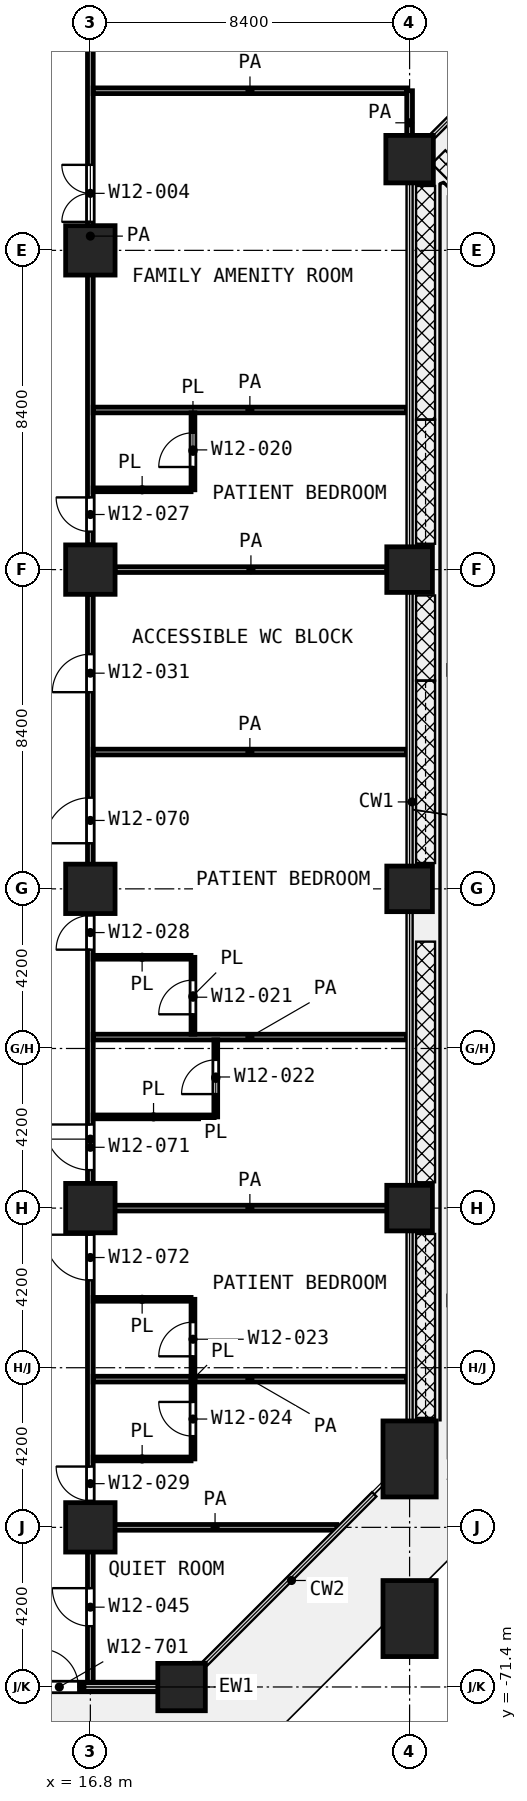
"""IFC4 building model, lengths in metres.
Left out: names, types, materials, properties, quantities, classifications, styles, units other than length and angle.
Written with IfcOpenShell. Run it as: python <this file> out.ifc"""

import sys

from ifc_helpers import new_model, si_unit, direction, frame, frame_2d, origin, origin_2d, place, context, subcontext, project, spatial, rectangle, extrude, element, fill, save


model = new_model("IFC4")
c1 = context("Model", 3, precision=1e-05, world=origin(), true_north=direction((0.0, 1.0)))
c2 = subcontext(c1, "Body", "Model", "MODEL_VIEW")
j1 = project(units=[si_unit("LENGTHUNIT", "METRE"), si_unit("PLANEANGLEUNIT", "RADIAN")], contexts=[c1])
p1 = place(None, origin())
s1 = spatial("IfcSite", under=j1, at=p1, CompositionType="ELEMENT")
p2 = place(p1, origin())
s2 = spatial("IfcBuilding", under=s1, at=p2, CompositionType="ELEMENT")
p3 = place(p2, frame((0.0, 0.0, 56.0)))
s3 = spatial("IfcBuildingStorey", under=s2, at=p3, CompositionType="ELEMENT", Elevation=56.0)
p4 = place(p3, frame((25.2, -31.2, 0.0), z_axis=(0.0, 0.0, 1.0), x_axis=(1.0, 0.0, 0.0)))
e1 = element("IfcColumn", 1, at=p4, inside=s3, PredefinedType="COLUMN", context=c2, shape_type="SweptSolid", body=[
    extrude(rectangle(XDim=1.25, YDim=1.25, at=origin_2d()), origin(), (0.0, 0.0, 1.0), 4.2),
])
for number, where, z_axis, x_axis in (
    (2, (16.8, -33.6, 0.0), (0.0, 0.0, 1.0), (1.0, 0.0, 0.0)),
    (3, (16.8, -42.0, 0.0), (0.0, 0.0, 1.0), (1.0, 0.0, 0.0)),
):
    element("IfcColumn", number, at=place(p3, frame(where, z_axis=z_axis, x_axis=x_axis)), inside=s3, PredefinedType="COLUMN", context=c2, shape_type="SweptSolid", body=[
        extrude(rectangle(XDim=1.3, YDim=1.3, at=origin_2d()), origin(), (0.0, 0.0, 1.0), 4.2),
    ])
p5 = place(p3, frame((25.2, -42.0, 0.0), z_axis=(0.0, 0.0, 1.0), x_axis=(1.0, 0.0, 0.0)))
e4 = element("IfcColumn", 4, at=p5, inside=s3, PredefinedType="COLUMN", context=c2, shape_type="SweptSolid", body=[
    extrude(rectangle(XDim=1.2, YDim=1.2, at=origin_2d()), origin(), (0.0, 0.0, 1.0), 4.2),
])
p6 = place(p3, frame((16.8, -50.4, 0.0), z_axis=(0.0, 0.0, 1.0), x_axis=(1.0, 0.0, 0.0)))
e5 = element("IfcColumn", 5, at=p6, inside=s3, PredefinedType="COLUMN", context=c2, shape_type="SweptSolid", body=[
    extrude(rectangle(XDim=1.3, YDim=1.3, at=origin_2d()), origin(), (0.0, 0.0, 1.0), 4.2),
])
p7 = place(p3, frame((25.2, -50.4, 0.0), z_axis=(0.0, 0.0, 1.0), x_axis=(1.0, 0.0, 0.0)))
e6 = element("IfcColumn", 6, at=p7, inside=s3, PredefinedType="COLUMN", context=c2, shape_type="SweptSolid", body=[
    extrude(rectangle(XDim=1.2, YDim=1.2, at=origin_2d()), origin(), (0.0, 0.0, 1.0), 4.2),
])
p8 = place(p3, frame((16.8, -58.8, 0.0), z_axis=(0.0, 0.0, 1.0), x_axis=(1.0, 0.0, 0.0)))
e7 = element("IfcColumn", 7, at=p8, inside=s3, PredefinedType="COLUMN", context=c2, shape_type="SweptSolid", body=[
    extrude(rectangle(XDim=1.3, YDim=1.3, at=origin_2d()), origin(), (0.0, 0.0, 1.0), 4.2),
])
p9 = place(p3, frame((25.2, -58.8, 0.0), z_axis=(0.0, 0.0, 1.0), x_axis=(1.0, 0.0, 0.0)))
e8 = element("IfcColumn", 8, at=p9, inside=s3, PredefinedType="COLUMN", context=c2, shape_type="SweptSolid", body=[
    extrude(rectangle(XDim=1.2, YDim=1.2, at=origin_2d()), origin(), (0.0, 0.0, 1.0), 4.2),
])
p10 = place(p3, frame((25.2, -65.4, 0.0), z_axis=(0.0, 0.0, 1.0), x_axis=(0.0, -1.0, 0.0)))
e9 = element("IfcColumn", 9, at=p10, inside=s3, PredefinedType="COLUMN", context=c2, shape_type="SweptSolid", body=[
    extrude(rectangle(XDim=2.0, YDim=1.4, at=origin_2d()), origin(), (0.0, 0.0, 1.0), 4.2),
])
p11 = place(p3, frame((16.8, -67.2, 0.0), z_axis=(0.0, 0.0, 1.0), x_axis=(1.0, 0.0, 0.0)))
e10 = element("IfcColumn", 10, at=p11, inside=s3, PredefinedType="COLUMN", context=c2, shape_type="SweptSolid", body=[
    extrude(rectangle(XDim=1.3, YDim=1.3, at=origin_2d()), origin(), (0.0, 0.0, 1.0), 4.2),
])
p12 = place(p3, frame((19.2, -71.4, 0.0), z_axis=(0.0, 0.0, 1.0), x_axis=(1.0, 0.0, 0.0)))
e11 = element("IfcColumn", 11, at=p12, inside=s3, PredefinedType="COLUMN", context=c2, shape_type="SweptSolid", body=[
    extrude(rectangle(XDim=1.25, YDim=1.25, at=origin_2d()), origin(), (0.0, 0.0, 1.0), 4.2),
])
p13 = place(p3, frame((25.2, -69.6, 0.0), z_axis=(0.0, 0.0, 1.0), x_axis=(0.0, -1.0, 0.0)))
e12 = element("IfcColumn", 12, at=p13, inside=s3, PredefinedType="COLUMN", context=c2, shape_type="SweptSolid", body=[
    extrude(rectangle(XDim=2.0, YDim=1.4, at=origin_2d()), origin(), (0.0, 0.0, 1.0), 4.2),
])
p14 = place(p3, frame((14.592, -71.4, 0.0), z_axis=(0.0, 0.0, 1.0), x_axis=(1.0, 0.0, 0.0)))
e13 = element("IfcWall", 13, at=p14, inside=s3, PredefinedType="SOLIDWALL", context=c2, shape_type="SweptSolid", body=[
    extrude(rectangle(XDim=3.983, YDim=0.25, at=frame_2d((1.992, 0.0))), origin(), (0.0, 0.0, 1.0), 3.78),
])
p15 = place(p14, frame((0.892, 0.0, 0.0)))
e14 = element("IfcOpeningElement", 14, at=p15, cuts=e13, PredefinedType="OPENING", context=c2, shape_type="SweptSolid", body=[
    extrude(rectangle(XDim=1.0, YDim=2.1, at=frame_2d((0.5, 1.05))), frame((0.0, 0.135, 0.0), z_axis=(0.0, -1.0, 0.0), x_axis=(1.0, 0.0, 0.0)), (0.0, 0.0, 1.0), 0.27),
])
for number, where, z_axis, x_axis in (
    (15, (16.875, -65.4, 0.0), (0.0, 0.0, 1.0), (1.0, 0.0, 0.0)),
    (16, (16.875, -61.2, 0.0), (0.0, 0.0, 1.0), (1.0, 0.0, 0.0)),
):
    element("IfcWall", number, at=place(p3, frame(where, z_axis=z_axis, x_axis=x_axis)), inside=s3, PredefinedType="PARTITIONING", context=c2, shape_type="SweptSolid", body=[
        extrude(rectangle(XDim=2.575, YDim=0.1, at=frame_2d((1.288, 0.0))), origin(), (0.0, 0.0, 1.0), 3.9),
    ])
p16 = place(p3, frame((16.875, -56.4, 0.0), z_axis=(0.0, 0.0, 1.0), x_axis=(1.0, 0.0, 0.0)))
e17 = element("IfcWall", 17, at=p16, inside=s3, PredefinedType="PARTITIONING", context=c2, shape_type="SweptSolid", body=[
    extrude(rectangle(XDim=3.175, YDim=0.1, at=frame_2d((1.587, 0.0))), origin(), (0.0, 0.0, 1.0), 3.9),
])
p17 = place(p3, frame((16.875, -52.2, 0.0), z_axis=(0.0, 0.0, 1.0), x_axis=(1.0, 0.0, 0.0)))
e18 = element("IfcWall", 18, at=p17, inside=s3, PredefinedType="PARTITIONING", context=c2, shape_type="SweptSolid", body=[
    extrude(rectangle(XDim=2.574, YDim=0.1, at=frame_2d((1.287, 0.0))), origin(), (0.0, 0.0, 1.0), 3.9),
])
p18 = place(p3, frame((16.875, -39.9, 0.0), z_axis=(0.0, 0.0, 1.0), x_axis=(1.0, 0.0, 0.0)))
e19 = element("IfcWall", 19, at=p18, inside=s3, PredefinedType="PARTITIONING", context=c2, shape_type="SweptSolid", body=[
    extrude(rectangle(XDim=2.575, YDim=0.1, at=frame_2d((1.288, 0.0))), origin(), (0.0, 0.0, 1.0), 3.9),
])
p19 = place(p3, frame((19.5, -65.4, 0.0), z_axis=(0.0, 0.0, 1.0), x_axis=(0.0, 1.0, 0.0)))
e20 = element("IfcWall", 20, at=p19, inside=s3, PredefinedType="PARTITIONING", context=c2, shape_type="SweptSolid", body=[
    extrude(rectangle(XDim=4.2, YDim=0.1, at=frame_2d((2.1, 0.0))), origin(), (0.0, 0.0, 1.0), 3.9),
])
p20 = place(p19, frame((2.7, 0.0, 0.0)))
e21 = element("IfcOpeningElement", 21, at=p20, cuts=e20, PredefinedType="OPENING", context=c2, shape_type="SweptSolid", body=[
    extrude(rectangle(XDim=0.9, YDim=2.1, at=frame_2d((0.45, 1.05))), frame((0.0, 0.06, 0.0), z_axis=(0.0, -1.0, 0.0), x_axis=(1.0, 0.0, 0.0)), (0.0, 0.0, 1.0), 0.12),
])
p21 = place(p19, frame((0.6, 0.0, 0.0)))
e22 = element("IfcOpeningElement", 22, at=p21, cuts=e20, PredefinedType="OPENING", context=c2, shape_type="SweptSolid", body=[
    extrude(rectangle(XDim=0.9, YDim=2.1, at=frame_2d((0.45, 1.05))), frame((0.0, 0.06, 0.0), z_axis=(0.0, -1.0, 0.0), x_axis=(1.0, 0.0, 0.0)), (0.0, 0.0, 1.0), 0.12),
])
p22 = place(p3, frame((19.5, -54.225, 0.0), z_axis=(0.0, 0.0, 1.0), x_axis=(0.0, 1.0, 0.0)))
e23 = element("IfcWall", 23, at=p22, inside=s3, PredefinedType="PARTITIONING", context=c2, shape_type="SweptSolid", body=[
    extrude(rectangle(XDim=2.023, YDim=0.1, at=frame_2d((1.012, 0.0))), origin(), (0.0, 0.0, 1.0), 3.9),
])
p23 = place(p22, frame((0.524, 0.0, 0.0)))
e24 = element("IfcOpeningElement", 24, at=p23, cuts=e23, PredefinedType="OPENING", context=c2, shape_type="SweptSolid", body=[
    extrude(rectangle(XDim=0.9, YDim=2.1, at=frame_2d((0.45, 1.05))), frame((0.0, 0.06, 0.0), z_axis=(0.0, -1.0, 0.0), x_axis=(1.0, 0.0, 0.0)), (0.0, 0.0, 1.0), 0.12),
])
p24 = place(p3, frame((19.5, -39.9, 0.0), z_axis=(0.0, 0.0, 1.0), x_axis=(0.0, 1.0, 0.0)))
e25 = element("IfcWall", 25, at=p24, inside=s3, PredefinedType="PARTITIONING", context=c2, shape_type="SweptSolid", body=[
    extrude(rectangle(XDim=2.025, YDim=0.1, at=frame_2d((1.012, 0.0))), origin(), (0.0, 0.0, 1.0), 3.9),
])
p25 = place(p24, frame((0.6, 0.0, 0.0)))
e26 = element("IfcOpeningElement", 26, at=p25, cuts=e25, PredefinedType="OPENING", context=c2, shape_type="SweptSolid", body=[
    extrude(rectangle(XDim=0.9, YDim=2.1, at=frame_2d((0.45, 1.05))), frame((0.0, 0.06, 0.0), z_axis=(0.0, -1.0, 0.0), x_axis=(1.0, 0.0, 0.0)), (0.0, 0.0, 1.0), 0.12),
])
p26 = place(p3, frame((20.1, -56.4, 0.0), z_axis=(0.0, 0.0, 1.0), x_axis=(0.0, 1.0, 0.0)))
e27 = element("IfcWall", 27, at=p26, inside=s3, PredefinedType="PARTITIONING", context=c2, shape_type="SweptSolid", body=[
    extrude(rectangle(XDim=2.025, YDim=0.1, at=frame_2d((1.012, 0.0))), origin(), (0.0, 0.0, 1.0), 3.9),
])
p27 = place(p26, frame((0.6, 0.0, 0.0)))
e28 = element("IfcOpeningElement", 28, at=p27, cuts=e27, PredefinedType="OPENING", context=c2, shape_type="SweptSolid", body=[
    extrude(rectangle(XDim=0.9, YDim=2.1, at=frame_2d((0.45, 1.05))), frame((0.0, 0.06, 0.0), z_axis=(0.0, -1.0, 0.0), x_axis=(1.0, 0.0, 0.0)), (0.0, 0.0, 1.0), 0.12),
])
p28 = place(p3, frame((16.875, -67.2, 0.0), z_axis=(0.0, 0.0, 1.0), x_axis=(1.0, 0.0, 0.0)))
e29 = element("IfcWall", 29, at=p28, inside=s3, PredefinedType="PARTITIONING", context=c2, shape_type="SweptSolid", body=[
    extrude(rectangle(XDim=6.412, YDim=0.15, at=frame_2d((3.206, 0.0))), origin(), (0.0, 0.0, 1.0), 3.9),
])
for number, where, z_axis, x_axis in (
    (30, (16.875, -63.3, 0.0), (0.0, 0.0, 1.0), (1.0, 0.0, 0.0)),
    (31, (16.875, -58.8, 0.0), (0.0, 0.0, 1.0), (1.0, 0.0, 0.0)),
    (32, (16.875, -54.3, 0.0), (0.0, 0.0, 1.0), (1.0, 0.0, 0.0)),
    (33, (16.875, -46.8, 0.0), (0.0, 0.0, 1.0), (1.0, 0.0, 0.0)),
):
    element("IfcWall", number, at=place(p3, frame(where, z_axis=z_axis, x_axis=x_axis)), inside=s3, PredefinedType="PARTITIONING", context=c2, shape_type="SweptSolid", body=[
        extrude(rectangle(XDim=8.245, YDim=0.15, at=frame_2d((4.123, 0.0))), origin(), (0.0, 0.0, 1.0), 3.9),
    ])
p29 = place(p3, frame((17.45, -42.0, 0.0), z_axis=(0.0, 0.0, 1.0), x_axis=(1.0, 0.0, 0.0)))
e34 = element("IfcWall", 34, at=p29, inside=s3, PredefinedType="PARTITIONING", context=c2, shape_type="SweptSolid", body=[
    extrude(rectangle(XDim=7.15, YDim=0.15, at=frame_2d((3.575, 0.0))), origin(), (0.0, 0.0, 1.0), 3.9),
])
p30 = place(p3, frame((16.875, -37.8, 0.0), z_axis=(0.0, 0.0, 1.0), x_axis=(1.0, 0.0, 0.0)))
e35 = element("IfcWall", 35, at=p30, inside=s3, PredefinedType="PARTITIONING", context=c2, shape_type="SweptSolid", body=[
    extrude(rectangle(XDim=8.245, YDim=0.15, at=frame_2d((4.123, 0.0))), origin(), (0.0, 0.0, 1.0), 3.9),
])
p31 = place(p3, frame((16.875, -29.4, 0.0), z_axis=(0.0, 0.0, 1.0), x_axis=(1.0, 0.0, 0.0)))
e36 = element("IfcWall", 36, at=p31, inside=s3, PredefinedType="PARTITIONING", context=c2, shape_type="SweptSolid", body=[
    extrude(rectangle(XDim=8.25, YDim=0.15, at=frame_2d((4.125, 0.0))), origin(), (0.0, 0.0, 1.0), 3.9),
])
p32 = place(p3, frame((16.8, -71.32, 0.0), z_axis=(0.0, 0.0, 1.0), x_axis=(0.0, 1.0, 0.0)))
e37 = element("IfcWall", 37, at=p32, inside=s3, PredefinedType="PARTITIONING", context=c2, shape_type="SweptSolid", body=[
    extrude(rectangle(XDim=28.67, YDim=0.15, at=frame_2d((14.335, 0.0))), origin(), (0.0, 0.0, 1.0), 3.9),
])
p33 = place(p32, frame((26.095, 0.0, 0.0)))
e38 = element("IfcOpeningElement", 38, at=p33, cuts=e37, PredefinedType="OPENING", context=c2, shape_type="SweptSolid", body=[
    extrude(rectangle(XDim=1.0, YDim=2.1, at=frame_2d((0.5, 1.05))), frame((0.0, 0.085, 0.0), z_axis=(0.0, -1.0, 0.0), x_axis=(1.0, 0.0, 0.0)), (0.0, 0.0, 1.0), 0.17),
])
p34 = place(p32, frame((22.12, 0.0, 0.0)))
e39 = element("IfcOpeningElement", 39, at=p34, cuts=e37, PredefinedType="OPENING", context=c2, shape_type="SweptSolid", body=[
    extrude(rectangle(XDim=1.2, YDim=2.1, at=frame_2d((0.6, 1.05))), frame((0.0, 0.085, 0.0), z_axis=(0.0, -1.0, 0.0), x_axis=(1.0, 0.0, 0.0)), (0.0, 0.0, 1.0), 0.17),
])
p35 = place(p32, frame((19.32, 0.0, 0.0)))
e40 = element("IfcOpeningElement", 40, at=p35, cuts=e37, PredefinedType="OPENING", context=c2, shape_type="SweptSolid", body=[
    extrude(rectangle(XDim=0.9, YDim=2.1, at=frame_2d((0.45, 1.05))), frame((0.0, 0.085, 0.0), z_axis=(0.0, -1.0, 0.0), x_axis=(1.0, 0.0, 0.0)), (0.0, 0.0, 1.0), 0.17),
])
p36 = place(p32, frame((13.52, 0.0, 0.0)))
e41 = element("IfcOpeningElement", 41, at=p36, cuts=e37, PredefinedType="OPENING", context=c2, shape_type="SweptSolid", body=[
    extrude(rectangle(XDim=1.2, YDim=2.1, at=frame_2d((0.6, 1.05))), frame((0.0, 0.085, 0.0), z_axis=(0.0, -1.0, 0.0), x_axis=(1.0, 0.0, 0.0)), (0.0, 0.0, 1.0), 0.17),
])
p37 = place(p32, frame((10.62, 0.0, 0.0)))
e42 = element("IfcOpeningElement", 42, at=p37, cuts=e37, PredefinedType="OPENING", context=c2, shape_type="SweptSolid", body=[
    extrude(rectangle(XDim=1.2, YDim=2.1, at=frame_2d((0.6, 1.05))), frame((0.0, 0.085, 0.0), z_axis=(0.0, -1.0, 0.0), x_axis=(1.0, 0.0, 0.0)), (0.0, 0.0, 1.0), 0.17),
])
p38 = place(p32, frame((4.82, 0.0, 0.0)))
e43 = element("IfcOpeningElement", 43, at=p38, cuts=e37, PredefinedType="OPENING", context=c2, shape_type="SweptSolid", body=[
    extrude(rectangle(XDim=0.9, YDim=2.1, at=frame_2d((0.45, 1.05))), frame((0.0, 0.085, 0.0), z_axis=(0.0, -1.0, 0.0), x_axis=(1.0, 0.0, 0.0)), (0.0, 0.0, 1.0), 0.17),
])
p39 = place(p32, frame((1.52, 0.0, 0.0)))
e44 = element("IfcOpeningElement", 44, at=p39, cuts=e37, PredefinedType="OPENING", context=c2, shape_type="SweptSolid", body=[
    extrude(rectangle(XDim=1.0, YDim=2.1, at=frame_2d((0.5, 1.05))), frame((0.0, 0.085, 0.0), z_axis=(0.0, -1.0, 0.0), x_axis=(1.0, 0.0, 0.0)), (0.0, 0.0, 1.0), 0.17),
])
p40 = place(p3, frame((16.8, -41.35, 0.0), z_axis=(0.0, 0.0, 1.0), x_axis=(0.0, 1.0, 0.0)))
e45 = element("IfcWall", 45, at=p40, inside=s3, PredefinedType="PARTITIONING", context=c2, shape_type="SweptSolid", body=[
    extrude(rectangle(XDim=16.25, YDim=0.15, at=frame_2d((8.125, 0.0))), origin(), (0.0, 0.0, 1.0), 3.9),
])
p41 = place(p40, frame((8.5, 0.0, 0.0)))
e46 = element("IfcOpeningElement", 46, at=p41, cuts=e45, PredefinedType="OPENING", context=c2, shape_type="SweptSolid", body=[
    extrude(rectangle(XDim=1.5, YDim=2.1, at=frame_2d((0.75, 1.05))), frame((0.0, 0.085, 0.0), z_axis=(0.0, -1.0, 0.0), x_axis=(1.0, 0.0, 0.0)), (0.0, 0.0, 1.0), 0.17),
])
p42 = place(p40, frame((0.35, 0.0, 0.0)))
e47 = element("IfcOpeningElement", 47, at=p42, cuts=e45, PredefinedType="OPENING", context=c2, shape_type="SweptSolid", body=[
    extrude(rectangle(XDim=0.9, YDim=2.1, at=frame_2d((0.45, 1.05))), frame((0.0, 0.085, 0.0), z_axis=(0.0, -1.0, 0.0), x_axis=(1.0, 0.0, 0.0)), (0.0, 0.0, 1.0), 0.17),
])
p43 = place(p3, frame((25.2, -31.087, 0.0), z_axis=(0.0, 0.0, 1.0), x_axis=(0.0, 1.0, 0.0)))
e48 = element("IfcWall", 48, at=p43, inside=s3, PredefinedType="PARTITIONING", context=c2, shape_type="SweptSolid", body=[
    extrude(rectangle(XDim=1.687, YDim=0.15, at=frame_2d((0.844, 0.0))), origin(), (0.0, 0.0, 1.0), 3.9),
])
p44 = place(p15, origin())
e49 = element("IfcDoor", 49, at=p44, inside=s3, OperationType="SINGLE_SWING_LEFT", PredefinedType="DOOR", context=c2, shape_type="SweptSolid", body=[
    extrude(rectangle(XDim=1.0, YDim=2.1, at=frame_2d((0.5, 1.05))), frame((0.0, 0.025, 0.0), z_axis=(0.0, -1.0, 0.0), x_axis=(1.0, 0.0, 0.0)), (0.0, 0.0, 1.0), 0.05),
])
fill(e14, e49)
p45 = place(p41, origin())
e50 = element("IfcDoor", 50, at=p45, inside=s3, OperationType="DOUBLE_DOOR_SINGLE_SWING", PredefinedType="DOOR", context=c2, shape_type="SweptSolid", body=[
    extrude(rectangle(XDim=1.5, YDim=2.1, at=frame_2d((0.75, 1.05))), frame((0.0, 0.025, 0.0), z_axis=(0.0, -1.0, 0.0), x_axis=(1.0, 0.0, 0.0)), (0.0, 0.0, 1.0), 0.05),
])
fill(e46, e50)
p46 = place(p42, origin())
e51 = element("IfcDoor", 51, at=p46, inside=s3, OperationType="SINGLE_SWING_RIGHT", PredefinedType="DOOR", context=c2, shape_type="SweptSolid", body=[
    extrude(rectangle(XDim=0.9, YDim=2.1, at=frame_2d((0.45, 1.05))), frame((0.0, 0.025, 0.0), z_axis=(0.0, -1.0, 0.0), x_axis=(1.0, 0.0, 0.0)), (0.0, 0.0, 1.0), 0.05),
])
fill(e47, e51)
p47 = place(p25, origin())
e52 = element("IfcDoor", 52, at=p47, inside=s3, OperationType="SINGLE_SWING_LEFT", PredefinedType="DOOR", context=c2, shape_type="SweptSolid", body=[
    extrude(rectangle(XDim=0.9, YDim=2.1, at=frame_2d((0.45, 1.05))), frame((0.0, 0.025, 0.0), z_axis=(0.0, -1.0, 0.0), x_axis=(1.0, 0.0, 0.0)), (0.0, 0.0, 1.0), 0.05),
])
fill(e26, e52)
p48 = place(p33, origin())
e53 = element("IfcDoor", 53, at=p48, inside=s3, OperationType="SINGLE_SWING_LEFT", PredefinedType="DOOR", context=c2, shape_type="SweptSolid", body=[
    extrude(rectangle(XDim=1.0, YDim=2.1, at=frame_2d((0.5, 1.05))), frame((0.0, 0.025, 0.0), z_axis=(0.0, -1.0, 0.0), x_axis=(1.0, 0.0, 0.0)), (0.0, 0.0, 1.0), 0.05),
])
fill(e38, e53)
p49 = place(p34, origin())
e54 = element("IfcDoor", 54, at=p49, inside=s3, OperationType="SINGLE_SWING_LEFT", PredefinedType="DOOR", context=c2, shape_type="SweptSolid", body=[
    extrude(rectangle(XDim=1.2, YDim=2.1, at=frame_2d((0.6, 1.05))), frame((0.0, 0.025, 0.0), z_axis=(0.0, -1.0, 0.0), x_axis=(1.0, 0.0, 0.0)), (0.0, 0.0, 1.0), 0.05),
])
fill(e39, e54)
p50 = place(p35, origin())
e55 = element("IfcDoor", 55, at=p50, inside=s3, OperationType="SINGLE_SWING_LEFT", PredefinedType="DOOR", context=c2, shape_type="SweptSolid", body=[
    extrude(rectangle(XDim=0.9, YDim=2.1, at=frame_2d((0.45, 1.05))), frame((0.0, 0.025, 0.0), z_axis=(0.0, -1.0, 0.0), x_axis=(1.0, 0.0, 0.0)), (0.0, 0.0, 1.0), 0.05),
])
fill(e40, e55)
p51 = place(p23, origin())
e56 = element("IfcDoor", 56, at=p51, inside=s3, OperationType="SINGLE_SWING_LEFT", PredefinedType="DOOR", context=c2, shape_type="SweptSolid", body=[
    extrude(rectangle(XDim=0.9, YDim=2.1, at=frame_2d((0.45, 1.05))), frame((0.0, 0.025, 0.0), z_axis=(0.0, -1.0, 0.0), x_axis=(1.0, 0.0, 0.0)), (0.0, 0.0, 1.0), 0.05),
])
fill(e24, e56)
p52 = place(p36, origin())
e57 = element("IfcDoor", 57, at=p52, inside=s3, OperationType="SINGLE_SWING_RIGHT", PredefinedType="DOOR", context=c2, shape_type="SweptSolid", body=[
    extrude(rectangle(XDim=1.2, YDim=2.1, at=frame_2d((0.6, 1.05))), frame((0.0, 0.025, 0.0), z_axis=(0.0, -1.0, 0.0), x_axis=(1.0, 0.0, 0.0)), (0.0, 0.0, 1.0), 0.05),
])
fill(e41, e57)
p53 = place(p27, origin())
e58 = element("IfcDoor", 58, at=p53, inside=s3, OperationType="SINGLE_SWING_LEFT", PredefinedType="DOOR", context=c2, shape_type="SweptSolid", body=[
    extrude(rectangle(XDim=0.9, YDim=2.1, at=frame_2d((0.45, 1.05))), frame((0.0, 0.025, 0.0), z_axis=(0.0, -1.0, 0.0), x_axis=(1.0, 0.0, 0.0)), (0.0, 0.0, 1.0), 0.05),
])
fill(e28, e58)
p54 = place(p37, origin())
e59 = element("IfcDoor", 59, at=p54, inside=s3, OperationType="SINGLE_SWING_RIGHT", PredefinedType="DOOR", context=c2, shape_type="SweptSolid", body=[
    extrude(rectangle(XDim=1.2, YDim=2.1, at=frame_2d((0.6, 1.05))), frame((0.0, 0.025, 0.0), z_axis=(0.0, -1.0, 0.0), x_axis=(1.0, 0.0, 0.0)), (0.0, 0.0, 1.0), 0.05),
])
fill(e42, e59)
p55 = place(p20, origin())
e60 = element("IfcDoor", 60, at=p55, inside=s3, OperationType="SINGLE_SWING_LEFT", PredefinedType="DOOR", context=c2, shape_type="SweptSolid", body=[
    extrude(rectangle(XDim=0.9, YDim=2.1, at=frame_2d((0.45, 1.05))), frame((0.0, 0.025, 0.0), z_axis=(0.0, -1.0, 0.0), x_axis=(1.0, 0.0, 0.0)), (0.0, 0.0, 1.0), 0.05),
])
fill(e21, e60)
p56 = place(p38, origin())
e61 = element("IfcDoor", 61, at=p56, inside=s3, OperationType="SINGLE_SWING_RIGHT", PredefinedType="DOOR", context=c2, shape_type="SweptSolid", body=[
    extrude(rectangle(XDim=0.9, YDim=2.1, at=frame_2d((0.45, 1.05))), frame((0.0, 0.025, 0.0), z_axis=(0.0, -1.0, 0.0), x_axis=(1.0, 0.0, 0.0)), (0.0, 0.0, 1.0), 0.05),
])
fill(e43, e61)
p57 = place(p21, origin())
e62 = element("IfcDoor", 62, at=p57, inside=s3, OperationType="SINGLE_SWING_RIGHT", PredefinedType="DOOR", context=c2, shape_type="SweptSolid", body=[
    extrude(rectangle(XDim=0.9, YDim=2.1, at=frame_2d((0.45, 1.05))), frame((0.0, 0.025, 0.0), z_axis=(0.0, -1.0, 0.0), x_axis=(1.0, 0.0, 0.0)), (0.0, 0.0, 1.0), 0.05),
])
fill(e22, e62)
p58 = place(p39, origin())
e63 = element("IfcDoor", 63, at=p58, inside=s3, OperationType="SINGLE_SWING_RIGHT", PredefinedType="DOOR", context=c2, shape_type="SweptSolid", body=[
    extrude(rectangle(XDim=1.0, YDim=2.1, at=frame_2d((0.5, 1.05))), frame((0.0, 0.025, 0.0), z_axis=(0.0, -1.0, 0.0), x_axis=(1.0, 0.0, 0.0)), (0.0, 0.0, 1.0), 0.05),
])
fill(e44, e63)
save(model, sys.argv[1])
